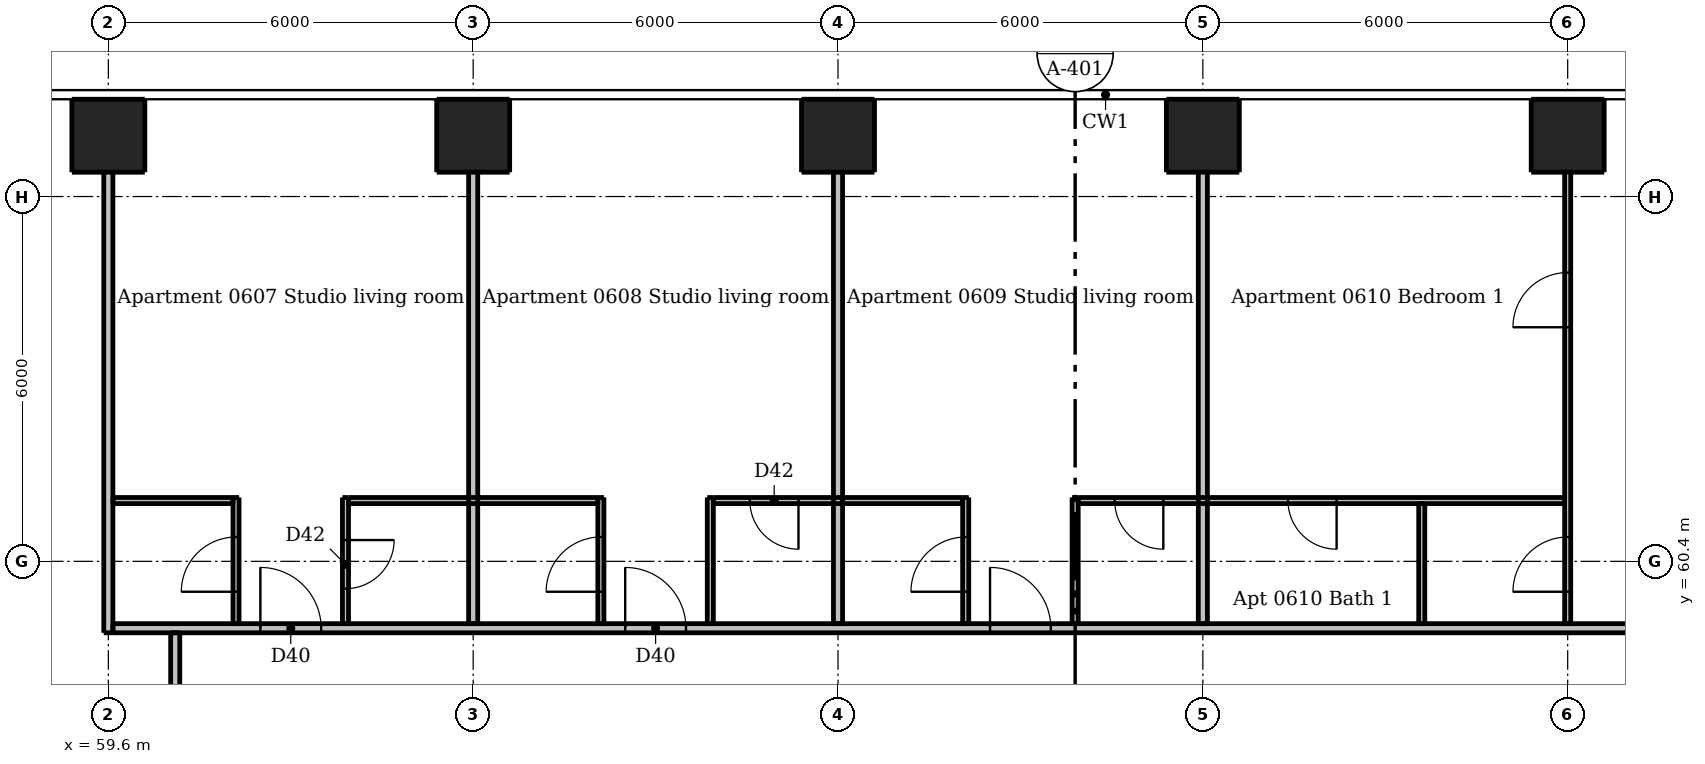
"""IFC4 building model, lengths in metres.
Left out: names, types, materials, properties, quantities, classifications, styles, units other than length and angle.
Written with IfcOpenShell. Run it as: python <this file> out.ifc"""

import sys

from ifc_helpers import new_model, si_unit, direction, frame, frame_2d, origin, origin_2d, place, context, subcontext, project, spatial, rectangle, extrude, element, fill, save


model = new_model("IFC4")
c1 = context("Model", 3, precision=1e-05, world=origin(), true_north=direction((0.0, 1.0)))
c2 = subcontext(c1, "Body", "Model", "MODEL_VIEW")
j1 = project(units=[si_unit("LENGTHUNIT", "METRE"), si_unit("PLANEANGLEUNIT", "RADIAN")], contexts=[c1])
p1 = place(None, origin())
s1 = spatial("IfcSite", under=j1, at=p1, CompositionType="ELEMENT")
p2 = place(p1, origin())
s2 = spatial("IfcBuilding", under=s1, at=p2, CompositionType="ELEMENT")
p3 = place(p2, frame((0.0, 0.0, 26.8)))
s3 = spatial("IfcBuildingStorey", under=s2, at=p3, CompositionType="ELEMENT", Elevation=26.8)
for number, where, z_axis, x_axis in (
    (1, (59.6, 67.4, 0.0), (0.0, 0.0, 1.0), (1.0, 0.0, 0.0)),
    (2, (65.6, 67.4, 0.0), (0.0, 0.0, 1.0), (1.0, 0.0, 0.0)),
    (3, (71.6, 67.4, 0.0), (0.0, 0.0, 1.0), (1.0, 0.0, 0.0)),
    (4, (77.6, 67.4, 0.0), (0.0, 0.0, 1.0), (1.0, 0.0, 0.0)),
    (5, (83.6, 67.4, 0.0), (0.0, 0.0, 1.0), (1.0, 0.0, 0.0)),
):
    element("IfcColumn", number, at=place(p3, frame(where, z_axis=z_axis, x_axis=x_axis)), inside=s3, PredefinedType="COLUMN", context=c2, shape_type="SweptSolid", body=[
        extrude(rectangle(XDim=1.2, YDim=1.2, at=origin_2d()), origin(), (0.0, 0.0, 1.0), 3.05),
    ])
p4 = place(p3, frame((61.7, 59.375, 0.0), z_axis=(0.0, 0.0, 1.0), x_axis=(0.0, 1.0, 0.0)))
e6 = element("IfcWall", 6, at=p4, inside=s3, PredefinedType="PARTITIONING", context=c2, shape_type="SweptSolid", body=[
    extrude(rectangle(XDim=2.075, YDim=0.1, at=frame_2d((1.038, 0.0))), origin(), (0.0, 0.0, 1.0), 3.05),
])
p5 = place(p4, frame((0.525, 0.0, 0.0)))
e7 = element("IfcOpeningElement", 7, at=p5, cuts=e6, PredefinedType="OPENING", context=c2, shape_type="SweptSolid", body=[
    extrude(rectangle(XDim=0.9, YDim=2.1, at=frame_2d((0.45, 1.05))), frame((0.0, 0.06, 0.0), z_axis=(0.0, -1.0, 0.0), x_axis=(1.0, 0.0, 0.0)), (0.0, 0.0, 1.0), 0.12),
])
p6 = place(p3, frame((63.5, 61.45, 0.0), z_axis=(0.0, 0.0, 1.0), x_axis=(0.0, -1.0, 0.0)))
e8 = element("IfcWall", 8, at=p6, inside=s3, PredefinedType="PARTITIONING", context=c2, shape_type="SweptSolid", body=[
    extrude(rectangle(XDim=2.075, YDim=0.1, at=frame_2d((1.038, 0.0))), origin(), (0.0, 0.0, 1.0), 3.05),
])
p7 = place(p6, frame((0.7, 0.0, 0.0)))
e9 = element("IfcOpeningElement", 9, at=p7, cuts=e8, PredefinedType="OPENING", context=c2, shape_type="SweptSolid", body=[
    extrude(rectangle(XDim=0.8, YDim=2.1, at=frame_2d((0.4, 1.05))), frame((0.0, 0.06, 0.0), z_axis=(0.0, -1.0, 0.0), x_axis=(1.0, 0.0, 0.0)), (0.0, 0.0, 1.0), 0.12),
])
p8 = place(p3, frame((67.7, 59.375, 0.0), z_axis=(0.0, 0.0, 1.0), x_axis=(0.0, 1.0, 0.0)))
e10 = element("IfcWall", 10, at=p8, inside=s3, PredefinedType="PARTITIONING", context=c2, shape_type="SweptSolid", body=[
    extrude(rectangle(XDim=2.075, YDim=0.1, at=frame_2d((1.038, 0.0))), origin(), (0.0, 0.0, 1.0), 3.05),
])
p9 = place(p8, frame((0.525, 0.0, 0.0)))
e11 = element("IfcOpeningElement", 11, at=p9, cuts=e10, PredefinedType="OPENING", context=c2, shape_type="SweptSolid", body=[
    extrude(rectangle(XDim=0.9, YDim=2.1, at=frame_2d((0.45, 1.05))), frame((0.0, 0.06, 0.0), z_axis=(0.0, -1.0, 0.0), x_axis=(1.0, 0.0, 0.0)), (0.0, 0.0, 1.0), 0.12),
])
p10 = place(p3, frame((69.5, 59.375, 0.0), z_axis=(0.0, 0.0, 1.0), x_axis=(0.0, 1.0, 0.0)))
e12 = element("IfcWall", 12, at=p10, inside=s3, PredefinedType="PARTITIONING", context=c2, shape_type="SweptSolid", body=[
    extrude(rectangle(XDim=2.075, YDim=0.1, at=frame_2d((1.038, 0.0))), origin(), (0.0, 0.0, 1.0), 3.05),
])
p11 = place(p3, frame((73.7, 59.375, 0.0), z_axis=(0.0, 0.0, 1.0), x_axis=(0.0, 1.0, 0.0)))
e13 = element("IfcWall", 13, at=p11, inside=s3, PredefinedType="PARTITIONING", context=c2, shape_type="SweptSolid", body=[
    extrude(rectangle(XDim=2.075, YDim=0.1, at=frame_2d((1.038, 0.0))), origin(), (0.0, 0.0, 1.0), 3.05),
])
p12 = place(p11, frame((0.525, 0.0, 0.0)))
e14 = element("IfcOpeningElement", 14, at=p12, cuts=e13, PredefinedType="OPENING", context=c2, shape_type="SweptSolid", body=[
    extrude(rectangle(XDim=0.9, YDim=2.1, at=frame_2d((0.45, 1.05))), frame((0.0, 0.06, 0.0), z_axis=(0.0, -1.0, 0.0), x_axis=(1.0, 0.0, 0.0)), (0.0, 0.0, 1.0), 0.12),
])
p13 = place(p3, frame((75.5, 59.375, 0.0), z_axis=(0.0, 0.0, 1.0), x_axis=(0.0, 1.0, 0.0)))
e15 = element("IfcWall", 15, at=p13, inside=s3, PredefinedType="PARTITIONING", context=c2, shape_type="SweptSolid", body=[
    extrude(rectangle(XDim=2.075, YDim=0.1, at=frame_2d((1.038, 0.0))), origin(), (0.0, 0.0, 1.0), 3.05),
])
p14 = place(p3, frame((81.2, 59.375, 0.0), z_axis=(0.0, 0.0, 1.0), x_axis=(0.0, 1.0, 0.0)))
e16 = element("IfcWall", 16, at=p14, inside=s3, PredefinedType="PARTITIONING", context=c2, shape_type="SweptSolid", body=[
    extrude(rectangle(XDim=1.975, YDim=0.1, at=frame_2d((0.988, 0.0))), origin(), (0.0, 0.0, 1.0), 3.05),
])
p15 = place(p3, frame((83.6, 59.375, 0.0), z_axis=(0.0, 0.0, 1.0), x_axis=(0.0, 1.0, 0.0)))
e17 = element("IfcWall", 17, at=p15, inside=s3, PredefinedType="PARTITIONING", context=c2, shape_type="SweptSolid", body=[
    extrude(rectangle(XDim=8.625, YDim=0.1, at=frame_2d((4.312, 0.0))), origin(), (0.0, 0.0, 1.0), 2.516),
])
p16 = place(p15, frame((0.525, 0.0, 0.0)))
e18 = element("IfcOpeningElement", 18, at=p16, cuts=e17, PredefinedType="OPENING", context=c2, shape_type="SweptSolid", body=[
    extrude(rectangle(XDim=0.9, YDim=2.1, at=frame_2d((0.45, 1.05))), frame((0.0, 0.06, 0.0), z_axis=(0.0, -1.0, 0.0), x_axis=(1.0, 0.0, 0.0)), (0.0, 0.0, 1.0), 0.12),
])
p17 = place(p15, frame((4.875, 0.0, 0.0)))
e19 = element("IfcOpeningElement", 19, at=p17, cuts=e17, PredefinedType="OPENING", context=c2, shape_type="SweptSolid", body=[
    extrude(rectangle(XDim=0.9, YDim=2.1, at=frame_2d((0.45, 1.05))), frame((0.0, 0.06, 0.0), z_axis=(0.0, -1.0, 0.0), x_axis=(1.0, 0.0, 0.0)), (0.0, 0.0, 1.0), 0.12),
])
p18 = place(p3, frame((59.675, 61.4, 0.0), z_axis=(0.0, 0.0, 1.0), x_axis=(1.0, 0.0, 0.0)))
e20 = element("IfcWall", 20, at=p18, inside=s3, PredefinedType="PARTITIONING", context=c2, shape_type="SweptSolid", body=[
    extrude(rectangle(XDim=1.975, YDim=0.1, at=frame_2d((0.987, 0.0))), origin(), (0.0, 0.0, 1.0), 3.05),
])
p19 = place(p3, frame((63.55, 61.4, 0.0), z_axis=(0.0, 0.0, 1.0), x_axis=(1.0, 0.0, 0.0)))
e21 = element("IfcWall", 21, at=p19, inside=s3, PredefinedType="PARTITIONING", context=c2, shape_type="SweptSolid", body=[
    extrude(rectangle(XDim=4.1, YDim=0.1, at=frame_2d((2.05, 0.0))), origin(), (0.0, 0.0, 1.0), 3.05),
])
p20 = place(p3, frame((73.65, 61.4, 0.0), z_axis=(0.0, 0.0, 1.0), x_axis=(-1.0, 0.0, 0.0)))
e22 = element("IfcWall", 22, at=p20, inside=s3, PredefinedType="PARTITIONING", context=c2, shape_type="SweptSolid", body=[
    extrude(rectangle(XDim=4.1, YDim=0.1, at=frame_2d((2.05, 0.0))), origin(), (0.0, 0.0, 1.0), 3.05),
])
p21 = place(p20, frame((2.7, 0.0, 0.0)))
e23 = element("IfcOpeningElement", 23, at=p21, cuts=e22, PredefinedType="OPENING", context=c2, shape_type="SweptSolid", body=[
    extrude(rectangle(XDim=0.8, YDim=2.1, at=frame_2d((0.4, 1.05))), frame((0.0, 0.06, 0.0), z_axis=(0.0, -1.0, 0.0), x_axis=(1.0, 0.0, 0.0)), (0.0, 0.0, 1.0), 0.12),
])
p22 = place(p3, frame((83.55, 61.4, 0.0), z_axis=(0.0, 0.0, 1.0), x_axis=(-1.0, 0.0, 0.0)))
e24 = element("IfcWall", 24, at=p22, inside=s3, PredefinedType="PARTITIONING", context=c2, shape_type="SweptSolid", body=[
    extrude(rectangle(XDim=8.0, YDim=0.1, at=frame_2d((4.0, 0.0))), origin(), (0.0, 0.0, 1.0), 3.05),
])
p23 = place(p22, frame((6.6, 0.0, 0.0)))
e25 = element("IfcOpeningElement", 25, at=p23, cuts=e24, PredefinedType="OPENING", context=c2, shape_type="SweptSolid", body=[
    extrude(rectangle(XDim=0.8, YDim=2.1, at=frame_2d((0.4, 1.05))), frame((0.0, 0.06, 0.0), z_axis=(0.0, -1.0, 0.0), x_axis=(1.0, 0.0, 0.0)), (0.0, 0.0, 1.0), 0.12),
])
p24 = place(p22, frame((3.75, 0.0, 0.0)))
e26 = element("IfcOpeningElement", 26, at=p24, cuts=e24, PredefinedType="OPENING", context=c2, shape_type="SweptSolid", body=[
    extrude(rectangle(XDim=0.8, YDim=2.1, at=frame_2d((0.4, 1.05))), frame((0.0, 0.06, 0.0), z_axis=(0.0, -1.0, 0.0), x_axis=(1.0, 0.0, 0.0)), (0.0, 0.0, 1.0), 0.12),
])
p25 = place(p3, frame((59.6, 59.225, 0.0), z_axis=(0.0, 0.0, 1.0), x_axis=(0.0, 1.0, 0.0)))
e27 = element("IfcWall", 27, at=p25, inside=s3, PredefinedType="PARTITIONING", context=c2, shape_type="SweptSolid", body=[
    extrude(rectangle(XDim=8.775, YDim=0.15, at=frame_2d((4.387, 0.0))), origin(), (0.0, 0.0, 1.0), 2.51),
])
p26 = place(p3, frame((60.7, 30.325, 0.0), z_axis=(0.0, 0.0, 1.0), x_axis=(0.0, 1.0, 0.0)))
e28 = element("IfcWall", 28, at=p26, inside=s3, PredefinedType="PARTITIONING", context=c2, shape_type="SweptSolid", body=[
    extrude(rectangle(XDim=28.9, YDim=0.15, at=frame_2d((14.45, 0.0))), origin(), (0.0, 0.0, 1.0), 3.05),
])
p27 = place(p26, frame((2.575, 0.0, 0.0)))
e29 = element("IfcOpeningElement", 29, at=p27, cuts=e28, PredefinedType="OPENING", context=c2, shape_type="SweptSolid", body=[
    extrude(rectangle(XDim=1.0, YDim=2.1, at=frame_2d((0.5, 1.05))), frame((0.0, 0.085, 0.0), z_axis=(0.0, -1.0, 0.0), x_axis=(1.0, 0.0, 0.0)), (0.0, 0.0, 1.0), 0.17),
])
p28 = place(p26, frame((8.575, 0.0, 0.0)))
e30 = element("IfcOpeningElement", 30, at=p28, cuts=e28, PredefinedType="OPENING", context=c2, shape_type="SweptSolid", body=[
    extrude(rectangle(XDim=1.0, YDim=2.1, at=frame_2d((0.5, 1.05))), frame((0.0, 0.085, 0.0), z_axis=(0.0, -1.0, 0.0), x_axis=(1.0, 0.0, 0.0)), (0.0, 0.0, 1.0), 0.17),
])
p29 = place(p26, frame((14.575, 0.0, 0.0)))
e31 = element("IfcOpeningElement", 31, at=p29, cuts=e28, PredefinedType="OPENING", context=c2, shape_type="SweptSolid", body=[
    extrude(rectangle(XDim=1.0, YDim=2.1, at=frame_2d((0.5, 1.05))), frame((0.0, 0.085, 0.0), z_axis=(0.0, -1.0, 0.0), x_axis=(1.0, 0.0, 0.0)), (0.0, 0.0, 1.0), 0.17),
])
p30 = place(p26, frame((26.025, 0.0, 0.0)))
e32 = element("IfcOpeningElement", 32, at=p30, cuts=e28, PredefinedType="OPENING", context=c2, shape_type="SweptSolid", body=[
    extrude(rectangle(XDim=1.0, YDim=2.1, at=frame_2d((0.5, 1.05))), frame((0.0, 0.085, 0.0), z_axis=(0.0, -1.0, 0.0), x_axis=(1.0, 0.0, 0.0)), (0.0, 0.0, 1.0), 0.17),
])
for number, where, z_axis, x_axis in (
    (33, (65.6, 59.375, 0.0), (0.0, 0.0, 1.0), (0.0, 1.0, 0.0)),
    (34, (71.6, 59.375, 0.0), (0.0, 0.0, 1.0), (0.0, 1.0, 0.0)),
    (35, (77.6, 59.375, 0.0), (0.0, 0.0, 1.0), (0.0, 1.0, 0.0)),
):
    element("IfcWall", number, at=place(p3, frame(where, z_axis=z_axis, x_axis=x_axis)), inside=s3, PredefinedType="PARTITIONING", context=c2, shape_type="SweptSolid", body=[
        extrude(rectangle(XDim=8.625, YDim=0.15, at=frame_2d((4.312, 0.0))), origin(), (0.0, 0.0, 1.0), 2.516),
    ])
p31 = place(p3, frame((59.675, 59.3, 0.0), z_axis=(0.0, 0.0, 1.0), x_axis=(1.0, 0.0, 0.0)))
e36 = element("IfcWall", 36, at=p31, inside=s3, PredefinedType="PARTITIONING", context=c2, shape_type="SweptSolid", body=[
    extrude(rectangle(XDim=28.55, YDim=0.15, at=frame_2d((14.275, 0.0))), origin(), (0.0, 0.0, 1.0), 3.05),
])
p32 = place(p31, frame((2.425, 0.0, 0.0)))
e37 = element("IfcOpeningElement", 37, at=p32, cuts=e36, PredefinedType="OPENING", context=c2, shape_type="SweptSolid", body=[
    extrude(rectangle(XDim=1.0, YDim=2.1, at=frame_2d((0.5, 1.05))), frame((0.0, 0.085, 0.0), z_axis=(0.0, -1.0, 0.0), x_axis=(1.0, 0.0, 0.0)), (0.0, 0.0, 1.0), 0.17),
])
p33 = place(p31, frame((8.425, 0.0, 0.0)))
e38 = element("IfcOpeningElement", 38, at=p33, cuts=e36, PredefinedType="OPENING", context=c2, shape_type="SweptSolid", body=[
    extrude(rectangle(XDim=1.0, YDim=2.1, at=frame_2d((0.5, 1.05))), frame((0.0, 0.085, 0.0), z_axis=(0.0, -1.0, 0.0), x_axis=(1.0, 0.0, 0.0)), (0.0, 0.0, 1.0), 0.17),
])
p34 = place(p31, frame((14.425, 0.0, 0.0)))
e39 = element("IfcOpeningElement", 39, at=p34, cuts=e36, PredefinedType="OPENING", context=c2, shape_type="SweptSolid", body=[
    extrude(rectangle(XDim=1.0, YDim=2.1, at=frame_2d((0.5, 1.05))), frame((0.0, 0.085, 0.0), z_axis=(0.0, -1.0, 0.0), x_axis=(1.0, 0.0, 0.0)), (0.0, 0.0, 1.0), 0.17),
])
p35 = place(p31, frame((25.775, 0.0, 0.0)))
e40 = element("IfcOpeningElement", 40, at=p35, cuts=e36, PredefinedType="OPENING", context=c2, shape_type="SweptSolid", body=[
    extrude(rectangle(XDim=1.0, YDim=2.1, at=frame_2d((0.5, 1.05))), frame((0.0, 0.085, 0.0), z_axis=(0.0, -1.0, 0.0), x_axis=(1.0, 0.0, 0.0)), (0.0, 0.0, 1.0), 0.17),
])
p36 = place(p32, origin())
e41 = element("IfcDoor", 41, at=p36, inside=s3, OperationType="SINGLE_SWING_LEFT", PredefinedType="DOOR", context=c2, shape_type="SweptSolid", body=[
    extrude(rectangle(XDim=1.0, YDim=2.1, at=frame_2d((0.5, 1.05))), frame((0.0, 0.025, 0.0), z_axis=(0.0, -1.0, 0.0), x_axis=(1.0, 0.0, 0.0)), (0.0, 0.0, 1.0), 0.05),
])
fill(e37, e41)
p37 = place(p5, origin())
e42 = element("IfcDoor", 42, at=p37, inside=s3, OperationType="SINGLE_SWING_LEFT", PredefinedType="DOOR", context=c2, shape_type="SweptSolid", body=[
    extrude(rectangle(XDim=0.9, YDim=2.1, at=frame_2d((0.45, 1.05))), frame((0.0, 0.025, 0.0), z_axis=(0.0, -1.0, 0.0), x_axis=(1.0, 0.0, 0.0)), (0.0, 0.0, 1.0), 0.05),
])
fill(e7, e42)
p38 = place(p7, origin())
e43 = element("IfcDoor", 43, at=p38, inside=s3, OperationType="SINGLE_SWING_LEFT", PredefinedType="DOOR", context=c2, shape_type="SweptSolid", body=[
    extrude(rectangle(XDim=0.8, YDim=2.1, at=frame_2d((0.4, 1.05))), frame((0.0, 0.025, 0.0), z_axis=(0.0, -1.0, 0.0), x_axis=(1.0, 0.0, 0.0)), (0.0, 0.0, 1.0), 0.05),
])
fill(e9, e43)
p39 = place(p33, origin())
e44 = element("IfcDoor", 44, at=p39, inside=s3, OperationType="SINGLE_SWING_LEFT", PredefinedType="DOOR", context=c2, shape_type="SweptSolid", body=[
    extrude(rectangle(XDim=1.0, YDim=2.1, at=frame_2d((0.5, 1.05))), frame((0.0, 0.025, 0.0), z_axis=(0.0, -1.0, 0.0), x_axis=(1.0, 0.0, 0.0)), (0.0, 0.0, 1.0), 0.05),
])
fill(e38, e44)
p40 = place(p9, origin())
e45 = element("IfcDoor", 45, at=p40, inside=s3, OperationType="SINGLE_SWING_LEFT", PredefinedType="DOOR", context=c2, shape_type="SweptSolid", body=[
    extrude(rectangle(XDim=0.9, YDim=2.1, at=frame_2d((0.45, 1.05))), frame((0.0, 0.025, 0.0), z_axis=(0.0, -1.0, 0.0), x_axis=(1.0, 0.0, 0.0)), (0.0, 0.0, 1.0), 0.05),
])
fill(e11, e45)
p41 = place(p21, origin())
e46 = element("IfcDoor", 46, at=p41, inside=s3, OperationType="SINGLE_SWING_LEFT", PredefinedType="DOOR", context=c2, shape_type="SweptSolid", body=[
    extrude(rectangle(XDim=0.8, YDim=2.1, at=frame_2d((0.4, 1.05))), frame((0.0, 0.025, 0.0), z_axis=(0.0, -1.0, 0.0), x_axis=(1.0, 0.0, 0.0)), (0.0, 0.0, 1.0), 0.05),
])
fill(e23, e46)
p42 = place(p34, origin())
e47 = element("IfcDoor", 47, at=p42, inside=s3, OperationType="SINGLE_SWING_LEFT", PredefinedType="DOOR", context=c2, shape_type="SweptSolid", body=[
    extrude(rectangle(XDim=1.0, YDim=2.1, at=frame_2d((0.5, 1.05))), frame((0.0, 0.025, 0.0), z_axis=(0.0, -1.0, 0.0), x_axis=(1.0, 0.0, 0.0)), (0.0, 0.0, 1.0), 0.05),
])
fill(e39, e47)
p43 = place(p12, origin())
e48 = element("IfcDoor", 48, at=p43, inside=s3, OperationType="SINGLE_SWING_LEFT", PredefinedType="DOOR", context=c2, shape_type="SweptSolid", body=[
    extrude(rectangle(XDim=0.9, YDim=2.1, at=frame_2d((0.45, 1.05))), frame((0.0, 0.025, 0.0), z_axis=(0.0, -1.0, 0.0), x_axis=(1.0, 0.0, 0.0)), (0.0, 0.0, 1.0), 0.05),
])
fill(e14, e48)
p44 = place(p23, origin())
e49 = element("IfcDoor", 49, at=p44, inside=s3, OperationType="SINGLE_SWING_LEFT", PredefinedType="DOOR", context=c2, shape_type="SweptSolid", body=[
    extrude(rectangle(XDim=0.8, YDim=2.1, at=frame_2d((0.4, 1.05))), frame((0.0, 0.025, 0.0), z_axis=(0.0, -1.0, 0.0), x_axis=(1.0, 0.0, 0.0)), (0.0, 0.0, 1.0), 0.05),
])
fill(e25, e49)
p45 = place(p16, origin())
e50 = element("IfcDoor", 50, at=p45, inside=s3, OperationType="SINGLE_SWING_LEFT", PredefinedType="DOOR", context=c2, shape_type="SweptSolid", body=[
    extrude(rectangle(XDim=0.9, YDim=2.1, at=frame_2d((0.45, 1.05))), frame((0.0, 0.025, 0.0), z_axis=(0.0, -1.0, 0.0), x_axis=(1.0, 0.0, 0.0)), (0.0, 0.0, 1.0), 0.05),
])
fill(e18, e50)
p46 = place(p17, origin())
e51 = element("IfcDoor", 51, at=p46, inside=s3, OperationType="SINGLE_SWING_LEFT", PredefinedType="DOOR", context=c2, shape_type="SweptSolid", body=[
    extrude(rectangle(XDim=0.9, YDim=2.1, at=frame_2d((0.45, 1.05))), frame((0.0, 0.025, 0.0), z_axis=(0.0, -1.0, 0.0), x_axis=(1.0, 0.0, 0.0)), (0.0, 0.0, 1.0), 0.05),
])
fill(e19, e51)
p47 = place(p24, origin())
e52 = element("IfcDoor", 52, at=p47, inside=s3, OperationType="SINGLE_SWING_LEFT", PredefinedType="DOOR", context=c2, shape_type="SweptSolid", body=[
    extrude(rectangle(XDim=0.8, YDim=2.1, at=frame_2d((0.4, 1.05))), frame((0.0, 0.025, 0.0), z_axis=(0.0, -1.0, 0.0), x_axis=(1.0, 0.0, 0.0)), (0.0, 0.0, 1.0), 0.05),
])
fill(e26, e52)
save(model, sys.argv[1])
